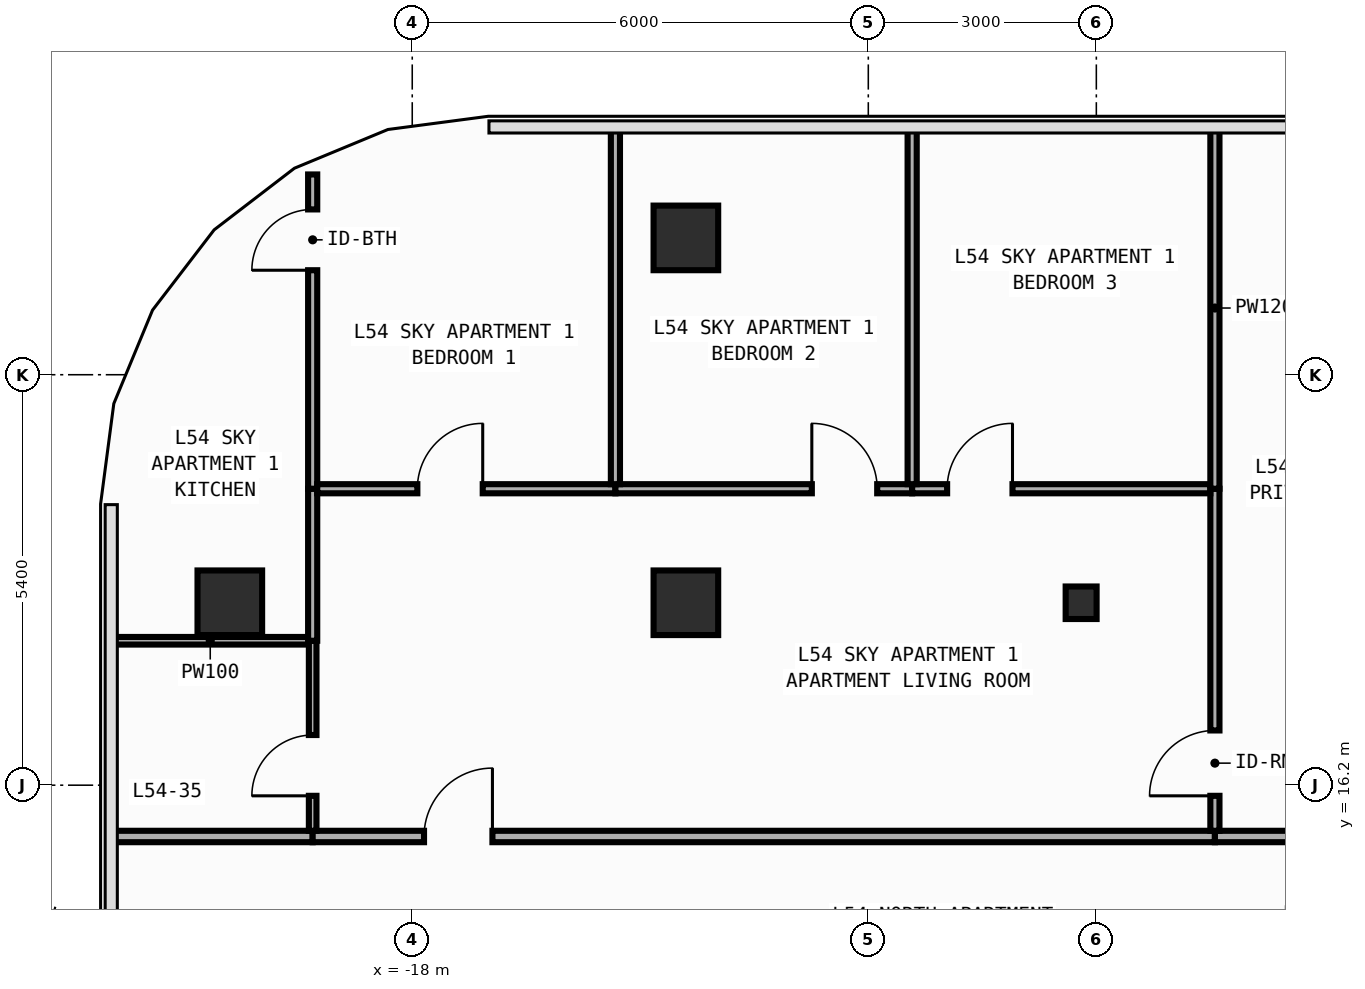
"""IFC4 building model, lengths in metres.
Left out: names, types, materials, properties, quantities, classifications, styles, units other than length and angle.
Written with IfcOpenShell. Run it as: python <this file> out.ifc"""

import sys

from ifc_helpers import new_model, si_unit, direction, frame, frame_2d, origin, origin_2d, place, context, subcontext, project, spatial, rectangle, i_section, extrude, element, fill, save


model = new_model("IFC4")
c1 = context("Model", 3, precision=1e-05, world=origin(), true_north=direction((0.0, 1.0)))
c2 = subcontext(c1, "Body", "Model", "MODEL_VIEW")
j1 = project(units=[si_unit("LENGTHUNIT", "METRE"), si_unit("PLANEANGLEUNIT", "RADIAN")], contexts=[c1])
p1 = place(None, origin())
s1 = spatial("IfcSite", under=j1, at=p1, CompositionType="ELEMENT")
p2 = place(p1, origin())
s2 = spatial("IfcBuilding", under=s1, at=p2, CompositionType="ELEMENT")
p3 = place(p2, frame((0.0, 0.0, 233.2)))
s3 = spatial("IfcBuildingStorey", under=s2, at=p3, CompositionType="ELEMENT", Elevation=233.2)
p4 = place(p3, frame((-9.2, 18.6, 0.0), z_axis=(0.0, 0.0, 1.0), x_axis=(1.0, 0.0, 0.0)))
e1 = element("IfcColumn", 1, at=p4, inside=s3, PredefinedType="COLUMN", context=c2, shape_type="SweptSolid", body=[
    extrude(i_section(OverallWidth=0.407, OverallDepth=0.428, WebThickness=0.02, FlangeThickness=0.035, FilletRadius=0.022, at=origin_2d()), origin(), (0.0, 0.0, 1.0), 3.6),
])
for number, where, z_axis, x_axis in (
    (2, (-20.4, 18.6, 0.0), (0.0, 0.0, 1.0), (1.0, 0.0, 0.0)),
    (3, (-14.4, 18.6, 0.0), (0.0, 0.0, 1.0), (1.0, 0.0, 0.0)),
    (4, (-14.4, 23.4, 0.0), (0.0, 0.0, 1.0), (1.0, 0.0, 0.0)),
):
    element("IfcColumn", number, at=place(p3, frame(where, z_axis=z_axis, x_axis=x_axis)), inside=s3, PredefinedType="COLUMN", context=c2, shape_type="SweptSolid", body=[
        extrude(rectangle(XDim=0.85, YDim=0.85, at=origin_2d()), origin(), (0.0, 0.0, 1.0), 3.6),
    ])
p5 = place(p3, frame((-21.955, 15.525, 0.0), z_axis=(0.0, 0.0, 1.0), x_axis=(1.0, 0.0, 0.0)))
e5 = element("IfcWall", 5, at=p5, inside=s3, PredefinedType="PARTITIONING", context=c2, shape_type="SweptSolid", body=[
    extrude(rectangle(XDim=2.645, YDim=0.15, at=frame_2d((1.323, 0.0))), origin(), (0.0, 0.0, 1.0), 3.34),
])
p6 = place(p3, frame((-19.31, 15.525, 0.0), z_axis=(0.0, 0.0, 1.0), x_axis=(1.0, 0.0, 0.0)))
e6 = element("IfcWall", 6, at=p6, inside=s3, PredefinedType="PARTITIONING", context=c2, shape_type="SweptSolid", body=[
    extrude(rectangle(XDim=11.87, YDim=0.15, at=frame_2d((5.935, 0.0))), origin(), (0.0, 0.0, 1.0), 3.34),
])
p7 = place(p6, frame((1.465, 0.0, 0.0)))
e7 = element("IfcOpeningElement", 7, at=p7, cuts=e6, PredefinedType="OPENING", context=c2, shape_type="SweptSolid", body=[
    extrude(rectangle(XDim=0.9, YDim=2.15, at=frame_2d((0.45, 1.075))), frame((0.0, 0.085, 0.0), z_axis=(0.0, -1.0, 0.0), x_axis=(1.0, 0.0, 0.0)), (0.0, 0.0, 1.0), 0.17),
])
p8 = place(p3, frame((-7.44, 15.525, 0.0), z_axis=(0.0, 0.0, 1.0), x_axis=(1.0, 0.0, 0.0)))
e8 = element("IfcWall", 8, at=p8, inside=s3, PredefinedType="PARTITIONING", context=c2, shape_type="SweptSolid", body=[
    extrude(rectangle(XDim=4.04, YDim=0.15, at=frame_2d((2.02, 0.0))), origin(), (0.0, 0.0, 1.0), 3.34),
])
p9 = place(p3, frame((-21.955, 18.1, 0.0), z_axis=(0.0, 0.0, 1.0), x_axis=(1.0, 0.0, 0.0)))
e9 = element("IfcWall", 9, at=p9, inside=s3, PredefinedType="PARTITIONING", context=c2, shape_type="SweptSolid", body=[
    extrude(rectangle(XDim=2.595, YDim=0.1, at=frame_2d((1.297, 0.0))), origin(), (0.0, 0.0, 1.0), 3.34),
])
p10 = place(p3, frame((-19.31, 15.6, 0.0), z_axis=(0.0, 0.0, 1.0), x_axis=(0.0, 1.0, 0.0)))
e10 = element("IfcWall", 10, at=p10, inside=s3, PredefinedType="PARTITIONING", context=c2, shape_type="SweptSolid", body=[
    extrude(rectangle(XDim=2.5, YDim=0.1, at=frame_2d((1.25, 0.0))), origin(), (0.0, 0.0, 1.0), 3.34),
])
p11 = place(p10, frame((0.46, 0.0, 0.0)))
e11 = element("IfcOpeningElement", 11, at=p11, cuts=e10, PredefinedType="OPENING", context=c2, shape_type="SweptSolid", body=[
    extrude(rectangle(XDim=0.8, YDim=2.1, at=frame_2d((0.4, 1.05))), frame((0.0, 0.06, 0.0), z_axis=(0.0, -1.0, 0.0), x_axis=(1.0, 0.0, 0.0)), (0.0, 0.0, 1.0), 0.12),
])
p12 = place(p3, frame((-19.31, 18.1, 0.0), z_axis=(0.0, 0.0, 1.0), x_axis=(0.0, 1.0, 0.0)))
e12 = element("IfcWall", 12, at=p12, inside=s3, PredefinedType="PARTITIONING", context=c2, shape_type="SweptSolid", body=[
    extrude(rectangle(XDim=2.0, YDim=0.12, at=frame_2d((1.0, 0.0))), origin(), (0.0, 0.0, 1.0), 3.34),
])
p13 = place(p3, frame((-19.31, 20.1, 0.0), z_axis=(0.0, 0.0, 1.0), x_axis=(0.0, 1.0, 0.0)))
e13 = element("IfcWall", 13, at=p13, inside=s3, PredefinedType="PARTITIONING", context=c2, shape_type="SweptSolid", body=[
    extrude(rectangle(XDim=4.135, YDim=0.12, at=frame_2d((2.067, 0.0))), origin(), (0.0, 0.0, 1.0), 3.34),
])
p14 = place(p13, frame((2.875, 0.0, 0.0)))
e14 = element("IfcOpeningElement", 14, at=p14, cuts=e13, PredefinedType="OPENING", context=c2, shape_type="SweptSolid", body=[
    extrude(rectangle(XDim=0.8, YDim=2.1, at=frame_2d((0.4, 1.05))), frame((0.0, 0.07, 0.0), z_axis=(0.0, -1.0, 0.0), x_axis=(1.0, 0.0, 0.0)), (0.0, 0.0, 1.0), 0.14),
])
p15 = place(p3, frame((-7.44, 15.6, 0.0), z_axis=(0.0, 0.0, 1.0), x_axis=(0.0, 1.0, 0.0)))
e15 = element("IfcWall", 15, at=p15, inside=s3, PredefinedType="PARTITIONING", context=c2, shape_type="SweptSolid", body=[
    extrude(rectangle(XDim=4.5, YDim=0.12, at=frame_2d((2.25, 0.0))), origin(), (0.0, 0.0, 1.0), 3.34),
])
p16 = place(p15, frame((0.46, 0.0, 0.0)))
e16 = element("IfcOpeningElement", 16, at=p16, cuts=e15, PredefinedType="OPENING", context=c2, shape_type="SweptSolid", body=[
    extrude(rectangle(XDim=0.86, YDim=2.15, at=frame_2d((0.43, 1.075))), frame((0.0, 0.07, 0.0), z_axis=(0.0, -1.0, 0.0), x_axis=(1.0, 0.0, 0.0)), (0.0, 0.0, 1.0), 0.14),
])
p17 = place(p3, frame((-19.25, 20.1, 0.0), z_axis=(0.0, 0.0, 1.0), x_axis=(1.0, 0.0, 0.0)))
e17 = element("IfcWall", 17, at=p17, inside=s3, PredefinedType="PARTITIONING", context=c2, shape_type="SweptSolid", body=[
    extrude(rectangle(XDim=3.923, YDim=0.12, at=frame_2d((1.961, 0.0))), origin(), (0.0, 0.0, 1.0), 3.34),
])
p18 = place(p17, frame((1.317, 0.0, 0.0)))
e18 = element("IfcOpeningElement", 18, at=p18, cuts=e17, PredefinedType="OPENING", context=c2, shape_type="SweptSolid", body=[
    extrude(rectangle(XDim=0.86, YDim=2.15, at=frame_2d((0.43, 1.075))), frame((0.0, 0.07, 0.0), z_axis=(0.0, -1.0, 0.0), x_axis=(1.0, 0.0, 0.0)), (0.0, 0.0, 1.0), 0.14),
])
p19 = place(p3, frame((-15.327, 20.1, 0.0), z_axis=(0.0, 0.0, 1.0), x_axis=(1.0, 0.0, 0.0)))
e19 = element("IfcWall", 19, at=p19, inside=s3, PredefinedType="PARTITIONING", context=c2, shape_type="SweptSolid", body=[
    extrude(rectangle(XDim=3.904, YDim=0.12, at=frame_2d((1.952, 0.0))), origin(), (0.0, 0.0, 1.0), 3.34),
])
p20 = place(p19, frame((2.584, 0.0, 0.0)))
e20 = element("IfcOpeningElement", 20, at=p20, cuts=e19, PredefinedType="OPENING", context=c2, shape_type="SweptSolid", body=[
    extrude(rectangle(XDim=0.86, YDim=2.15, at=frame_2d((0.43, 1.075))), frame((0.0, 0.07, 0.0), z_axis=(0.0, -1.0, 0.0), x_axis=(1.0, 0.0, 0.0)), (0.0, 0.0, 1.0), 0.14),
])
p21 = place(p3, frame((-11.423, 20.1, 0.0), z_axis=(0.0, 0.0, 1.0), x_axis=(1.0, 0.0, 0.0)))
e21 = element("IfcWall", 21, at=p21, inside=s3, PredefinedType="PARTITIONING", context=c2, shape_type="SweptSolid", body=[
    extrude(rectangle(XDim=3.923, YDim=0.12, at=frame_2d((1.961, 0.0))), origin(), (0.0, 0.0, 1.0), 3.34),
])
p22 = place(p21, frame((0.46, 0.0, 0.0)))
e22 = element("IfcOpeningElement", 22, at=p22, cuts=e21, PredefinedType="OPENING", context=c2, shape_type="SweptSolid", body=[
    extrude(rectangle(XDim=0.86, YDim=2.15, at=frame_2d((0.43, 1.075))), frame((0.0, 0.07, 0.0), z_axis=(0.0, -1.0, 0.0), x_axis=(1.0, 0.0, 0.0)), (0.0, 0.0, 1.0), 0.14),
])
p23 = place(p3, frame((-7.44, 20.1, 0.0), z_axis=(0.0, 0.0, 1.0), x_axis=(0.0, 1.0, 0.0)))
e23 = element("IfcWall", 23, at=p23, inside=s3, PredefinedType="PARTITIONING", context=c2, shape_type="SweptSolid", body=[
    extrude(rectangle(XDim=4.755, YDim=0.12, at=frame_2d((2.377, 0.0))), origin(), (0.0, 0.0, 1.0), 3.34),
])
for number, where, z_axis, x_axis in (
    (24, (-15.327, 20.16, 0.0), (0.0, 0.0, 1.0), (0.0, 1.0, 0.0)),
    (25, (-11.423, 20.16, 0.0), (0.0, 0.0, 1.0), (0.0, 1.0, 0.0)),
):
    element("IfcWall", number, at=place(p3, frame(where, z_axis=z_axis, x_axis=x_axis)), inside=s3, PredefinedType="PARTITIONING", context=c2, shape_type="SweptSolid", body=[
        extrude(rectangle(XDim=4.695, YDim=0.12, at=frame_2d((2.348, 0.0))), origin(), (0.0, 0.0, 1.0), 3.34),
    ])
p24 = place(p7, origin())
e26 = element("IfcDoor", 26, at=p24, inside=s3, OperationType="SINGLE_SWING_RIGHT", PredefinedType="DOOR", context=c2, shape_type="SweptSolid", body=[
    extrude(rectangle(XDim=0.9, YDim=2.15, at=frame_2d((0.45, 1.075))), frame((0.0, 0.025, 0.0), z_axis=(0.0, -1.0, 0.0), x_axis=(1.0, 0.0, 0.0)), (0.0, 0.0, 1.0), 0.05),
])
fill(e7, e26)
p25 = place(p11, origin())
e27 = element("IfcDoor", 27, at=p25, inside=s3, OperationType="SINGLE_SWING_LEFT", PredefinedType="DOOR", context=c2, shape_type="SweptSolid", body=[
    extrude(rectangle(XDim=0.8, YDim=2.1, at=frame_2d((0.4, 1.05))), frame((0.0, 0.025, 0.0), z_axis=(0.0, -1.0, 0.0), x_axis=(1.0, 0.0, 0.0)), (0.0, 0.0, 1.0), 0.05),
])
fill(e11, e27)
p26 = place(p16, origin())
e28 = element("IfcDoor", 28, at=p26, inside=s3, OperationType="SINGLE_SWING_LEFT", PredefinedType="DOOR", context=c2, shape_type="SweptSolid", body=[
    extrude(rectangle(XDim=0.86, YDim=2.15, at=frame_2d((0.43, 1.075))), frame((0.0, 0.025, 0.0), z_axis=(0.0, -1.0, 0.0), x_axis=(1.0, 0.0, 0.0)), (0.0, 0.0, 1.0), 0.05),
])
fill(e16, e28)
p27 = place(p18, origin())
e29 = element("IfcDoor", 29, at=p27, inside=s3, OperationType="SINGLE_SWING_RIGHT", PredefinedType="DOOR", context=c2, shape_type="SweptSolid", body=[
    extrude(rectangle(XDim=0.86, YDim=2.15, at=frame_2d((0.43, 1.075))), frame((0.0, 0.025, 0.0), z_axis=(0.0, -1.0, 0.0), x_axis=(1.0, 0.0, 0.0)), (0.0, 0.0, 1.0), 0.05),
])
fill(e18, e29)
p28 = place(p20, origin())
e30 = element("IfcDoor", 30, at=p28, inside=s3, OperationType="SINGLE_SWING_LEFT", PredefinedType="DOOR", context=c2, shape_type="SweptSolid", body=[
    extrude(rectangle(XDim=0.86, YDim=2.15, at=frame_2d((0.43, 1.075))), frame((0.0, 0.025, 0.0), z_axis=(0.0, -1.0, 0.0), x_axis=(1.0, 0.0, 0.0)), (0.0, 0.0, 1.0), 0.05),
])
fill(e20, e30)
p29 = place(p22, origin())
e31 = element("IfcDoor", 31, at=p29, inside=s3, OperationType="SINGLE_SWING_RIGHT", PredefinedType="DOOR", context=c2, shape_type="SweptSolid", body=[
    extrude(rectangle(XDim=0.86, YDim=2.15, at=frame_2d((0.43, 1.075))), frame((0.0, 0.025, 0.0), z_axis=(0.0, -1.0, 0.0), x_axis=(1.0, 0.0, 0.0)), (0.0, 0.0, 1.0), 0.05),
])
fill(e22, e31)
p30 = place(p14, origin())
e32 = element("IfcDoor", 32, at=p30, inside=s3, OperationType="SINGLE_SWING_LEFT", PredefinedType="DOOR", context=c2, shape_type="SweptSolid", body=[
    extrude(rectangle(XDim=0.8, YDim=2.1, at=frame_2d((0.4, 1.05))), frame((0.0, 0.025, 0.0), z_axis=(0.0, -1.0, 0.0), x_axis=(1.0, 0.0, 0.0)), (0.0, 0.0, 1.0), 0.05),
])
fill(e14, e32)
save(model, sys.argv[1])
